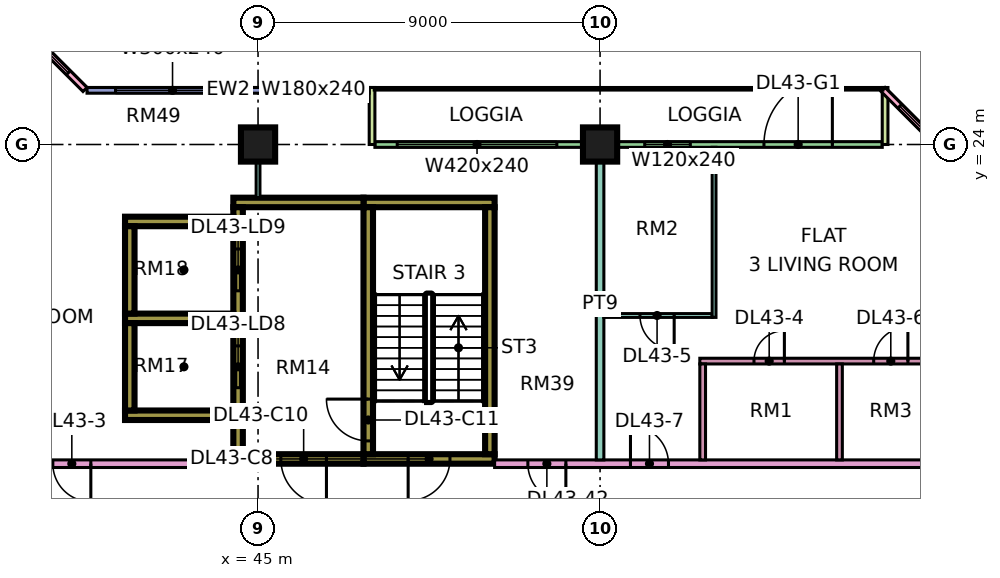
"""IFC4 building model, lengths in metres.
Left out: names, types, materials, properties, quantities, classifications, styles, units other than length and angle.
Written with IfcOpenShell. Run it as: python <this file> out.ifc"""

import sys

from ifc_helpers import new_model, si_unit, direction, frame, frame_2d, origin, origin_2d, place, context, subcontext, project, spatial, rectangle, extrude, element, fill, save


model = new_model("IFC4")
c1 = context("Model", 3, precision=1e-05, world=origin(), true_north=direction((0.0, 1.0)))
c2 = subcontext(c1, "Body", "Model", "MODEL_VIEW")
j1 = project(units=[si_unit("LENGTHUNIT", "METRE"), si_unit("PLANEANGLEUNIT", "RADIAN")], contexts=[c1])
p1 = place(None, origin())
s1 = spatial("IfcSite", under=j1, at=p1, CompositionType="ELEMENT")
p2 = place(p1, origin())
s2 = spatial("IfcBuilding", under=s1, at=p2, CompositionType="ELEMENT")
p3 = place(p2, frame((0.0, 0.0, 187.4)))
s3 = spatial("IfcBuildingStorey", under=s2, at=p3, CompositionType="ELEMENT", Elevation=187.4)
for number, where, z_axis, x_axis in (
    (1, (45.0, 24.0, 0.0), (0.0, 0.0, 1.0), (1.0, 0.0, 0.0)),
    (2, (54.0, 24.0, 0.0), (0.0, 0.0, 1.0), (1.0, 0.0, 0.0)),
):
    element("IfcColumn", number, at=place(p3, frame(where, z_axis=z_axis, x_axis=x_axis)), inside=s3, PredefinedType="COLUMN", context=c2, shape_type="SweptSolid", body=[
        extrude(rectangle(XDim=0.9, YDim=0.9, at=origin_2d()), origin(), (0.0, 0.0, 1.0), 3.75),
    ])
p4 = place(p3, frame((47.775, 15.725, 0.0), z_axis=(0.0, 0.0, 1.0), x_axis=(1.0, 0.0, 0.0)))
e3 = element("IfcWall", 3, at=p4, inside=s3, PredefinedType="SHEAR", context=c2, shape_type="SweptSolid", body=[
    extrude(rectangle(XDim=3.45, YDim=0.25, at=frame_2d((1.725, 0.0))), origin(), (0.0, 0.0, 1.0), 3.75),
])
p5 = place(p4, frame((1.175, 0.0, 0.0)))
e4 = element("IfcOpeningElement", 4, at=p5, cuts=e3, PredefinedType="OPENING", context=c2, shape_type="SweptSolid", body=[
    extrude(rectangle(XDim=1.1, YDim=2.2, at=frame_2d((0.55, 1.1))), frame((0.0, 0.135, 0.0), z_axis=(0.0, -1.0, 0.0), x_axis=(1.0, 0.0, 0.0)), (0.0, 0.0, 1.0), 0.27),
])
p6 = place(p3, frame((47.775, 22.475, 0.0), z_axis=(0.0, 0.0, 1.0), x_axis=(1.0, 0.0, 0.0)))
e5 = element("IfcWall", 5, at=p6, inside=s3, PredefinedType="SHEAR", context=c2, shape_type="SweptSolid", body=[
    extrude(rectangle(XDim=3.45, YDim=0.25, at=frame_2d((1.725, 0.0))), origin(), (0.0, 0.0, 1.0), 3.75),
])
p7 = place(p3, frame((47.9, 15.85, 0.0), z_axis=(0.0, 0.0, 1.0), x_axis=(0.0, 1.0, 0.0)))
e6 = element("IfcWall", 6, at=p7, inside=s3, PredefinedType="SHEAR", context=c2, shape_type="SweptSolid", body=[
    extrude(rectangle(XDim=6.5, YDim=0.25, at=frame_2d((3.25, 0.0))), origin(), (0.0, 0.0, 1.0), 3.75),
])
p8 = place(p7, frame((0.35, 0.0, 0.0)))
e7 = element("IfcOpeningElement", 7, at=p8, cuts=e6, PredefinedType="OPENING", context=c2, shape_type="SweptSolid", body=[
    extrude(rectangle(XDim=1.1, YDim=2.2, at=frame_2d((0.55, 1.1))), frame((0.0, 0.135, 0.0), z_axis=(0.0, -1.0, 0.0), x_axis=(1.0, 0.0, 0.0)), (0.0, 0.0, 1.0), 0.27),
])
p9 = place(p3, frame((51.1, 15.85, 0.0), z_axis=(0.0, 0.0, 1.0), x_axis=(0.0, 1.0, 0.0)))
e8 = element("IfcWall", 8, at=p9, inside=s3, PredefinedType="SHEAR", context=c2, shape_type="SweptSolid", body=[
    extrude(rectangle(XDim=6.5, YDim=0.25, at=frame_2d((3.25, 0.0))), origin(), (0.0, 0.0, 1.0), 3.75),
])
p10 = place(p3, frame((44.35, 15.725, 0.0), z_axis=(0.0, 0.0, 1.0), x_axis=(1.0, 0.0, 0.0)))
e9 = element("IfcWall", 9, at=p10, inside=s3, PredefinedType="SHEAR", context=c2, shape_type="SweptSolid", body=[
    extrude(rectangle(XDim=3.425, YDim=0.25, at=frame_2d((1.712, 0.0))), origin(), (0.0, 0.0, 1.0), 3.75),
])
p11 = place(p10, frame((1.25, 0.0, 0.0)))
e10 = element("IfcOpeningElement", 10, at=p11, cuts=e9, PredefinedType="OPENING", context=c2, shape_type="SweptSolid", body=[
    extrude(rectangle(XDim=1.2, YDim=2.2, at=frame_2d((0.6, 1.1))), frame((0.0, 0.135, 0.0), z_axis=(0.0, -1.0, 0.0), x_axis=(1.0, 0.0, 0.0)), (0.0, 0.0, 1.0), 0.27),
])
p12 = place(p3, frame((44.35, 22.475, 0.0), z_axis=(0.0, 0.0, 1.0), x_axis=(1.0, 0.0, 0.0)))
e11 = element("IfcWall", 11, at=p12, inside=s3, PredefinedType="SHEAR", context=c2, shape_type="SweptSolid", body=[
    extrude(rectangle(XDim=3.425, YDim=0.25, at=frame_2d((1.712, 0.0))), origin(), (0.0, 0.0, 1.0), 3.75),
])
p13 = place(p3, frame((44.475, 15.85, 0.0), z_axis=(0.0, 0.0, 1.0), x_axis=(0.0, 1.0, 0.0)))
e12 = element("IfcWall", 12, at=p13, inside=s3, PredefinedType="SHEAR", context=c2, shape_type="SweptSolid", body=[
    extrude(rectangle(XDim=6.5, YDim=0.25, at=frame_2d((3.25, 0.0))), origin(), (0.0, 0.0, 1.0), 3.75),
])
p14 = place(p13, frame((1.75, 0.0, 0.0)))
e13 = element("IfcOpeningElement", 13, at=p14, cuts=e12, PredefinedType="OPENING", context=c2, shape_type="SweptSolid", body=[
    extrude(rectangle(XDim=1.1, YDim=2.2, at=frame_2d((0.55, 1.1))), frame((0.0, 0.135, 0.0), z_axis=(0.0, -1.0, 0.0), x_axis=(1.0, 0.0, 0.0)), (0.0, 0.0, 1.0), 0.27),
])
p15 = place(p13, frame((4.3, 0.0, 0.0)))
e14 = element("IfcOpeningElement", 14, at=p15, cuts=e12, PredefinedType="OPENING", context=c2, shape_type="SweptSolid", body=[
    extrude(rectangle(XDim=1.1, YDim=2.2, at=frame_2d((0.55, 1.1))), frame((0.0, 0.135, 0.0), z_axis=(0.0, -1.0, 0.0), x_axis=(1.0, 0.0, 0.0)), (0.0, 0.0, 1.0), 0.27),
])
for number, where, z_axis, x_axis in (
    (15, (41.5, 16.875, 0.0), (0.0, 0.0, 1.0), (1.0, 0.0, 0.0)),
    (16, (41.5, 19.425, 0.0), (0.0, 0.0, 1.0), (1.0, 0.0, 0.0)),
    (17, (41.5, 21.975, 0.0), (0.0, 0.0, 1.0), (1.0, 0.0, 0.0)),
):
    element("IfcWall", number, at=place(p3, frame(where, z_axis=z_axis, x_axis=x_axis)), inside=s3, PredefinedType="SHEAR", context=c2, shape_type="SweptSolid", body=[
        extrude(rectangle(XDim=2.85, YDim=0.25, at=frame_2d((1.425, 0.0))), origin(), (0.0, 0.0, 1.0), 3.75),
    ])
for number, where, z_axis, x_axis in (
    (18, (41.625, 17.0, 0.0), (0.0, 0.0, 1.0), (0.0, 1.0, 0.0)),
    (19, (41.625, 19.55, 0.0), (0.0, 0.0, 1.0), (0.0, 1.0, 0.0)),
):
    element("IfcWall", number, at=place(p3, frame(where, z_axis=z_axis, x_axis=x_axis)), inside=s3, PredefinedType="SHEAR", context=c2, shape_type="SweptSolid", body=[
        extrude(rectangle(XDim=2.3, YDim=0.25, at=frame_2d((1.15, 0.0))), origin(), (0.0, 0.0, 1.0), 3.75),
    ])
p16 = place(p3, frame((61.425, 24.0, 0.0), z_axis=(0.0, 0.0, 1.0), x_axis=(-1.0, 0.0, 0.0)))
e20 = element("IfcWall", 20, at=p16, inside=s3, PredefinedType="SOLIDWALL", context=c2, shape_type="SweptSolid", body=[
    extrude(rectangle(XDim=13.35, YDim=0.15, at=frame_2d((6.675, 0.0))), origin(), (0.0, 0.0, 1.0), 3.35),
])
p17 = place(p16, frame((1.312, 0.0, 0.0)))
e21 = element("IfcOpeningElement", 21, at=p17, cuts=e20, PredefinedType="OPENING", context=c2, shape_type="SweptSolid", body=[
    extrude(rectangle(XDim=1.8, YDim=2.4, at=frame_2d((0.9, 1.2))), frame((0.0, 0.085, 0.0), z_axis=(0.0, -1.0, 0.0), x_axis=(1.0, 0.0, 0.0)), (0.0, 0.0, 1.0), 0.17),
])
p18 = place(p16, frame((5.05, 0.0, 0.45)))
e22 = element("IfcOpeningElement", 22, at=p18, cuts=e20, PredefinedType="OPENING", context=c2, shape_type="SweptSolid", body=[
    extrude(rectangle(XDim=1.2, YDim=2.4, at=frame_2d((0.6, 1.2))), frame((0.0, 0.085, 0.0), z_axis=(0.0, -1.0, 0.0), x_axis=(1.0, 0.0, 0.0)), (0.0, 0.0, 1.0), 0.17),
])
p19 = place(p16, frame((8.562, 0.0, 0.45)))
e23 = element("IfcOpeningElement", 23, at=p19, cuts=e20, PredefinedType="OPENING", context=c2, shape_type="SweptSolid", body=[
    extrude(rectangle(XDim=4.2, YDim=2.4, at=frame_2d((2.1, 1.2))), frame((0.0, 0.085, 0.0), z_axis=(0.0, -1.0, 0.0), x_axis=(1.0, 0.0, 0.0)), (0.0, 0.0, 1.0), 0.17),
])
for number, where, z_axis, x_axis in (
    (24, (61.5, 25.5, 0.0), (0.0, 0.0, 1.0), (0.0, -1.0, 0.0)),
    (25, (48.0, 25.5, 0.0), (0.0, 0.0, 1.0), (0.0, -1.0, 0.0)),
):
    element("IfcWall", number, at=place(p3, frame(where, z_axis=z_axis, x_axis=x_axis)), inside=s3, PredefinedType="SOLIDWALL", context=c2, shape_type="SweptSolid", body=[
        extrude(rectangle(XDim=1.5, YDim=0.15, at=frame_2d((0.75, 0.0))), origin(), (0.0, 0.0, 1.0), 3.35),
    ])
p20 = place(p3, frame((47.925, 25.425, 0.0), z_axis=(0.0, 0.0, 1.0), x_axis=(-1.0, 0.0, 0.0)))
e26 = element("IfcWall", 26, at=p20, inside=s3, PredefinedType="SOLIDWALL", context=c2, shape_type="SweptSolid", body=[
    extrude(rectangle(XDim=7.425, YDim=0.15, at=frame_2d((3.712, 0.0))), origin(), (0.0, 0.0, 1.0), 3.35),
])
p21 = place(p20, frame((0.562, 0.0, 0.45)))
e27 = element("IfcOpeningElement", 27, at=p21, cuts=e26, PredefinedType="OPENING", context=c2, shape_type="SweptSolid", body=[
    extrude(rectangle(XDim=1.8, YDim=2.4, at=frame_2d((0.9, 1.2))), frame((0.0, 0.085, 0.0), z_axis=(0.0, -1.0, 0.0), x_axis=(1.0, 0.0, 0.0)), (0.0, 0.0, 1.0), 0.17),
])
p22 = place(p20, frame((3.675, 0.0, 0.45)))
e28 = element("IfcOpeningElement", 28, at=p22, cuts=e26, PredefinedType="OPENING", context=c2, shape_type="SweptSolid", body=[
    extrude(rectangle(XDim=3.0, YDim=2.4, at=frame_2d((1.5, 1.2))), frame((0.0, 0.085, 0.0), z_axis=(0.0, -1.0, 0.0), x_axis=(1.0, 0.0, 0.0)), (0.0, 0.0, 1.0), 0.17),
])
p23 = place(p3, frame((40.447, 25.447, 0.0), z_axis=(0.0, 0.0, 1.0), x_axis=(-0.707106781187, 0.707106781187, 0.0)))
e29 = element("IfcWall", 29, at=p23, inside=s3, PredefinedType="SOLIDWALL", context=c2, shape_type="SweptSolid", body=[
    extrude(rectangle(XDim=4.243, YDim=0.15, at=frame_2d((2.121, 0.0))), origin(), (0.0, 0.0, 1.0), 3.35),
])
p24 = place(p23, frame((0.621, 0.0, 0.45)))
e30 = element("IfcOpeningElement", 30, at=p24, cuts=e29, PredefinedType="OPENING", context=c2, shape_type="SweptSolid", body=[
    extrude(rectangle(XDim=3.0, YDim=2.4, at=frame_2d((1.5, 1.2))), frame((0.0, 0.085, 0.0), z_axis=(0.0, -1.0, 0.0), x_axis=(1.0, 0.0, 0.0)), (0.0, 0.0, 1.0), 0.17),
])
p25 = place(p3, frame((64.447, 22.447, 0.0), z_axis=(0.0, 0.0, 1.0), x_axis=(-0.707106781187, 0.707106781187, 0.0)))
e31 = element("IfcWall", 31, at=p25, inside=s3, PredefinedType="SOLIDWALL", context=c2, shape_type="SweptSolid", body=[
    extrude(rectangle(XDim=4.243, YDim=0.15, at=frame_2d((2.121, 0.0))), origin(), (0.0, 0.0, 1.0), 3.35),
])
p26 = place(p25, frame((0.621, 0.0, 0.45)))
e32 = element("IfcOpeningElement", 32, at=p26, cuts=e31, PredefinedType="OPENING", context=c2, shape_type="SweptSolid", body=[
    extrude(rectangle(XDim=3.0, YDim=2.4, at=frame_2d((1.5, 1.2))), frame((0.0, 0.085, 0.0), z_axis=(0.0, -1.0, 0.0), x_axis=(1.0, 0.0, 0.0)), (0.0, 0.0, 1.0), 0.17),
])
p27 = place(p3, frame((34.0, 15.6, 0.0), z_axis=(0.0, 0.0, 1.0), x_axis=(1.0, 0.0, 0.0)))
e33 = element("IfcWall", 33, at=p27, inside=s3, PredefinedType="PARTITIONING", context=c2, shape_type="SweptSolid", body=[
    extrude(rectangle(XDim=10.35, YDim=0.2, at=frame_2d((5.175, 0.0))), origin(), (0.0, 0.0, 1.0), 3.35),
])
p28 = place(p27, frame((5.6, 0.0, 0.0)))
e34 = element("IfcOpeningElement", 34, at=p28, cuts=e33, PredefinedType="OPENING", context=c2, shape_type="SweptSolid", body=[
    extrude(rectangle(XDim=1.0, YDim=2.1, at=frame_2d((0.5, 1.05))), frame((0.0, 0.11, 0.0), z_axis=(0.0, -1.0, 0.0), x_axis=(1.0, 0.0, 0.0)), (0.0, 0.0, 1.0), 0.22),
])
p29 = place(p27, frame((0.45, 0.0, 0.0)))
e35 = element("IfcOpeningElement", 35, at=p29, cuts=e33, PredefinedType="OPENING", context=c2, shape_type="SweptSolid", body=[
    extrude(rectangle(XDim=1.2, YDim=2.1, at=frame_2d((0.6, 1.05))), frame((0.0, 0.11, 0.0), z_axis=(0.0, -1.0, 0.0), x_axis=(1.0, 0.0, 0.0)), (0.0, 0.0, 1.0), 0.22),
])
p30 = place(p3, frame((45.0, 22.6, 0.0), z_axis=(0.0, 0.0, 1.0), x_axis=(0.0, 1.0, 0.0)))
e36 = element("IfcWall", 36, at=p30, inside=s3, PredefinedType="PARTITIONING", context=c2, shape_type="SweptSolid", body=[
    extrude(rectangle(XDim=1.4, YDim=0.1, at=frame_2d((0.7, 0.0))), origin(), (0.0, 0.0, 1.0), 3.35),
])
p31 = place(p3, frame((51.225, 15.6, 0.0), z_axis=(0.0, 0.0, 1.0), x_axis=(1.0, 0.0, 0.0)))
e37 = element("IfcWall", 37, at=p31, inside=s3, PredefinedType="PARTITIONING", context=c2, shape_type="SweptSolid", body=[
    extrude(rectangle(XDim=13.125, YDim=0.2, at=frame_2d((6.562, 0.0))), origin(), (0.0, 0.0, 1.0), 3.35),
])
p32 = place(p31, frame((3.575, 0.0, 0.0)))
e38 = element("IfcOpeningElement", 38, at=p32, cuts=e37, PredefinedType="OPENING", context=c2, shape_type="SweptSolid", body=[
    extrude(rectangle(XDim=1.0, YDim=2.1, at=frame_2d((0.5, 1.05))), frame((0.0, 0.11, 0.0), z_axis=(0.0, -1.0, 0.0), x_axis=(1.0, 0.0, 0.0)), (0.0, 0.0, 1.0), 0.22),
])
p33 = place(p31, frame((0.875, 0.0, 0.0)))
e39 = element("IfcOpeningElement", 39, at=p33, cuts=e37, PredefinedType="OPENING", context=c2, shape_type="SweptSolid", body=[
    extrude(rectangle(XDim=1.0, YDim=2.1, at=frame_2d((0.5, 1.05))), frame((0.0, 0.11, 0.0), z_axis=(0.0, -1.0, 0.0), x_axis=(1.0, 0.0, 0.0)), (0.0, 0.0, 1.0), 0.22),
])
p34 = place(p3, frame((54.0, 15.7, 0.0), z_axis=(0.0, 0.0, 1.0), x_axis=(0.0, 1.0, 0.0)))
e40 = element("IfcWall", 40, at=p34, inside=s3, PredefinedType="PARTITIONING", context=c2, shape_type="SweptSolid", body=[
    extrude(rectangle(XDim=8.226, YDim=0.2, at=frame_2d((4.113, 0.0))), origin(), (0.0, 0.0, 1.0), 3.35),
])
p35 = place(p3, frame((54.1, 19.5, 0.0), z_axis=(0.0, 0.0, 1.0), x_axis=(1.0, 0.0, 0.0)))
e41 = element("IfcWall", 41, at=p35, inside=s3, PredefinedType="PARTITIONING", context=c2, shape_type="SweptSolid", body=[
    extrude(rectangle(XDim=2.85, YDim=0.1, at=frame_2d((1.425, 0.0))), origin(), (0.0, 0.0, 1.0), 3.35),
])
p36 = place(p35, frame((0.95, 0.0, 0.0)))
e42 = element("IfcOpeningElement", 42, at=p36, cuts=e41, PredefinedType="OPENING", context=c2, shape_type="SweptSolid", body=[
    extrude(rectangle(XDim=0.9, YDim=2.1, at=frame_2d((0.45, 1.05))), frame((0.0, 0.06, 0.0), z_axis=(0.0, -1.0, 0.0), x_axis=(1.0, 0.0, 0.0)), (0.0, 0.0, 1.0), 0.12),
])
p37 = place(p3, frame((56.625, 18.3, 0.0), z_axis=(0.0, 0.0, 1.0), x_axis=(1.0, 0.0, 0.0)))
e43 = element("IfcWall", 43, at=p37, inside=s3, PredefinedType="PARTITIONING", context=c2, shape_type="SweptSolid", body=[
    extrude(rectangle(XDim=7.725, YDim=0.15, at=frame_2d((3.863, 0.0))), origin(), (0.0, 0.0, 1.0), 3.35),
])
p38 = place(p37, frame((1.425, 0.0, 0.0)))
e44 = element("IfcOpeningElement", 44, at=p38, cuts=e43, PredefinedType="OPENING", context=c2, shape_type="SweptSolid", body=[
    extrude(rectangle(XDim=0.8, YDim=2.1, at=frame_2d((0.4, 1.05))), frame((0.0, 0.085, 0.0), z_axis=(0.0, -1.0, 0.0), x_axis=(1.0, 0.0, 0.0)), (0.0, 0.0, 1.0), 0.17),
])
p39 = place(p37, frame((4.575, 0.0, 0.0)))
e45 = element("IfcOpeningElement", 45, at=p39, cuts=e43, PredefinedType="OPENING", context=c2, shape_type="SweptSolid", body=[
    extrude(rectangle(XDim=0.9, YDim=2.1, at=frame_2d((0.45, 1.05))), frame((0.0, 0.085, 0.0), z_axis=(0.0, -1.0, 0.0), x_axis=(1.0, 0.0, 0.0)), (0.0, 0.0, 1.0), 0.17),
])
p40 = place(p3, frame((56.7, 15.7, 0.0), z_axis=(0.0, 0.0, 1.0), x_axis=(0.0, 1.0, 0.0)))
e46 = element("IfcWall", 46, at=p40, inside=s3, PredefinedType="PARTITIONING", context=c2, shape_type="SweptSolid", body=[
    extrude(rectangle(XDim=2.525, YDim=0.15, at=frame_2d((1.263, 0.0))), origin(), (0.0, 0.0, 1.0), 3.35),
])
p41 = place(p3, frame((57.0, 19.45, 0.0), z_axis=(0.0, 0.0, 1.0), x_axis=(0.0, 1.0, 0.0)))
e47 = element("IfcWall", 47, at=p41, inside=s3, PredefinedType="PARTITIONING", context=c2, shape_type="SweptSolid", body=[
    extrude(rectangle(XDim=4.476, YDim=0.1, at=frame_2d((2.238, 0.0))), origin(), (0.0, 0.0, 1.0), 3.35),
])
p42 = place(p3, frame((60.3, 15.7, 0.0), z_axis=(0.0, 0.0, 1.0), x_axis=(0.0, 1.0, 0.0)))
e48 = element("IfcWall", 48, at=p42, inside=s3, PredefinedType="PARTITIONING", context=c2, shape_type="SweptSolid", body=[
    extrude(rectangle(XDim=2.525, YDim=0.15, at=frame_2d((1.263, 0.0))), origin(), (0.0, 0.0, 1.0), 3.35),
])
p43 = place(p17, frame((1.8, 0.0, 0.0), z_axis=(0.0, 0.0, 1.0), x_axis=(-1.0, 0.0, 0.0)))
e49 = element("IfcDoor", 49, at=p43, inside=s3, OperationType="DOUBLE_DOOR_SINGLE_SWING", PredefinedType="DOOR", context=c2, shape_type="SweptSolid", body=[
    extrude(rectangle(XDim=1.8, YDim=2.4, at=frame_2d((0.9, 1.2))), frame((0.0, 0.025, 0.0), z_axis=(0.0, -1.0, 0.0), x_axis=(1.0, 0.0, 0.0)), (0.0, 0.0, 1.0), 0.05),
])
fill(e21, e49)
p44 = place(p18, origin())
e50 = element("IfcWindow", 50, at=p44, inside=s3, PartitioningType="SINGLE_PANEL", PredefinedType="WINDOW", context=c2, shape_type="SweptSolid", body=[
    extrude(rectangle(XDim=1.2, YDim=2.4, at=frame_2d((0.6, 1.2))), frame((0.0, 0.03, 0.0), z_axis=(0.0, -1.0, 0.0), x_axis=(1.0, 0.0, 0.0)), (0.0, 0.0, 1.0), 0.06),
])
fill(e22, e50)
p45 = place(p19, origin())
e51 = element("IfcWindow", 51, at=p45, inside=s3, PartitioningType="SINGLE_PANEL", PredefinedType="WINDOW", context=c2, shape_type="SweptSolid", body=[
    extrude(rectangle(XDim=4.2, YDim=2.4, at=frame_2d((2.1, 1.2))), frame((0.0, 0.03, 0.0), z_axis=(0.0, -1.0, 0.0), x_axis=(1.0, 0.0, 0.0)), (0.0, 0.0, 1.0), 0.06),
])
fill(e23, e51)
p46 = place(p21, origin())
e52 = element("IfcWindow", 52, at=p46, inside=s3, PartitioningType="SINGLE_PANEL", PredefinedType="WINDOW", context=c2, shape_type="SweptSolid", body=[
    extrude(rectangle(XDim=1.8, YDim=2.4, at=frame_2d((0.9, 1.2))), frame((0.0, 0.03, 0.0), z_axis=(0.0, -1.0, 0.0), x_axis=(1.0, 0.0, 0.0)), (0.0, 0.0, 1.0), 0.06),
])
fill(e27, e52)
p47 = place(p22, origin())
e53 = element("IfcWindow", 53, at=p47, inside=s3, PartitioningType="SINGLE_PANEL", PredefinedType="WINDOW", context=c2, shape_type="SweptSolid", body=[
    extrude(rectangle(XDim=3.0, YDim=2.4, at=frame_2d((1.5, 1.2))), frame((0.0, 0.03, 0.0), z_axis=(0.0, -1.0, 0.0), x_axis=(1.0, 0.0, 0.0)), (0.0, 0.0, 1.0), 0.06),
])
fill(e28, e53)
p48 = place(p24, origin())
e54 = element("IfcWindow", 54, at=p48, inside=s3, PartitioningType="SINGLE_PANEL", PredefinedType="WINDOW", context=c2, shape_type="SweptSolid", body=[
    extrude(rectangle(XDim=3.0, YDim=2.4, at=frame_2d((1.5, 1.2))), frame((0.0, 0.03, 0.0), z_axis=(0.0, -1.0, 0.0), x_axis=(1.0, 0.0, 0.0)), (0.0, 0.0, 1.0), 0.06),
])
fill(e30, e54)
p49 = place(p26, origin())
e55 = element("IfcWindow", 55, at=p49, inside=s3, PartitioningType="SINGLE_PANEL", PredefinedType="WINDOW", context=c2, shape_type="SweptSolid", body=[
    extrude(rectangle(XDim=3.0, YDim=2.4, at=frame_2d((1.5, 1.2))), frame((0.0, 0.03, 0.0), z_axis=(0.0, -1.0, 0.0), x_axis=(1.0, 0.0, 0.0)), (0.0, 0.0, 1.0), 0.06),
])
fill(e32, e55)
p50 = place(p5, frame((1.1, 0.0, 0.0), z_axis=(0.0, 0.0, 1.0), x_axis=(-1.0, 0.0, 0.0)))
e56 = element("IfcDoor", 56, at=p50, inside=s3, OperationType="SINGLE_SWING_LEFT", PredefinedType="DOOR", context=c2, shape_type="SweptSolid", body=[
    extrude(rectangle(XDim=1.1, YDim=2.2, at=frame_2d((0.55, 1.1))), frame((0.0, 0.025, 0.0), z_axis=(0.0, -1.0, 0.0), x_axis=(1.0, 0.0, 0.0)), (0.0, 0.0, 1.0), 0.05),
])
fill(e4, e56)
p51 = place(p11, origin())
e57 = element("IfcDoor", 57, at=p51, inside=s3, OperationType="SINGLE_SWING_RIGHT", PredefinedType="DOOR", context=c2, shape_type="SweptSolid", body=[
    extrude(rectangle(XDim=1.2, YDim=2.2, at=frame_2d((0.6, 1.1))), frame((0.0, 0.025, 0.0), z_axis=(0.0, -1.0, 0.0), x_axis=(1.0, 0.0, 0.0)), (0.0, 0.0, 1.0), 0.05),
])
fill(e10, e57)
p52 = place(p8, frame((1.1, 0.0, 0.0), z_axis=(0.0, 0.0, 1.0), x_axis=(-1.0, 0.0, 0.0)))
e58 = element("IfcDoor", 58, at=p52, inside=s3, OperationType="SINGLE_SWING_RIGHT", PredefinedType="DOOR", context=c2, shape_type="SweptSolid", body=[
    extrude(rectangle(XDim=1.1, YDim=2.2, at=frame_2d((0.55, 1.1))), frame((0.0, 0.025, 0.0), z_axis=(0.0, -1.0, 0.0), x_axis=(1.0, 0.0, 0.0)), (0.0, 0.0, 1.0), 0.05),
])
fill(e7, e58)
p53 = place(p14, origin())
e59 = element("IfcDoor", 59, at=p53, inside=s3, OperationType="DOUBLE_DOOR_SLIDING", PredefinedType="DOOR", context=c2, shape_type="SweptSolid", body=[
    extrude(rectangle(XDim=1.1, YDim=2.2, at=frame_2d((0.55, 1.1))), frame((0.0, 0.025, 0.0), z_axis=(0.0, -1.0, 0.0), x_axis=(1.0, 0.0, 0.0)), (0.0, 0.0, 1.0), 0.05),
])
fill(e13, e59)
p54 = place(p15, origin())
e60 = element("IfcDoor", 60, at=p54, inside=s3, OperationType="DOUBLE_DOOR_SLIDING", PredefinedType="DOOR", context=c2, shape_type="SweptSolid", body=[
    extrude(rectangle(XDim=1.1, YDim=2.2, at=frame_2d((0.55, 1.1))), frame((0.0, 0.025, 0.0), z_axis=(0.0, -1.0, 0.0), x_axis=(1.0, 0.0, 0.0)), (0.0, 0.0, 1.0), 0.05),
])
fill(e14, e60)
p55 = place(p28, origin())
e61 = element("IfcDoor", 61, at=p55, inside=s3, OperationType="SINGLE_SWING_RIGHT", PredefinedType="DOOR", context=c2, shape_type="SweptSolid", body=[
    extrude(rectangle(XDim=1.0, YDim=2.1, at=frame_2d((0.5, 1.05))), frame((0.0, 0.025, 0.0), z_axis=(0.0, -1.0, 0.0), x_axis=(1.0, 0.0, 0.0)), (0.0, 0.0, 1.0), 0.05),
])
fill(e34, e61)
p56 = place(p38, frame((0.8, 0.0, 0.0), z_axis=(0.0, 0.0, 1.0), x_axis=(-1.0, 0.0, 0.0)))
e62 = element("IfcDoor", 62, at=p56, inside=s3, OperationType="SINGLE_SWING_RIGHT", PredefinedType="DOOR", context=c2, shape_type="SweptSolid", body=[
    extrude(rectangle(XDim=0.8, YDim=2.1, at=frame_2d((0.4, 1.05))), frame((0.0, 0.025, 0.0), z_axis=(0.0, -1.0, 0.0), x_axis=(1.0, 0.0, 0.0)), (0.0, 0.0, 1.0), 0.05),
])
fill(e44, e62)
p57 = place(p36, origin())
e63 = element("IfcDoor", 63, at=p57, inside=s3, OperationType="SINGLE_SWING_RIGHT", PredefinedType="DOOR", context=c2, shape_type="SweptSolid", body=[
    extrude(rectangle(XDim=0.9, YDim=2.1, at=frame_2d((0.45, 1.05))), frame((0.0, 0.025, 0.0), z_axis=(0.0, -1.0, 0.0), x_axis=(1.0, 0.0, 0.0)), (0.0, 0.0, 1.0), 0.05),
])
fill(e42, e63)
p58 = place(p39, frame((0.9, 0.0, 0.0), z_axis=(0.0, 0.0, 1.0), x_axis=(-1.0, 0.0, 0.0)))
e64 = element("IfcDoor", 64, at=p58, inside=s3, OperationType="SINGLE_SWING_RIGHT", PredefinedType="DOOR", context=c2, shape_type="SweptSolid", body=[
    extrude(rectangle(XDim=0.9, YDim=2.1, at=frame_2d((0.45, 1.05))), frame((0.0, 0.025, 0.0), z_axis=(0.0, -1.0, 0.0), x_axis=(1.0, 0.0, 0.0)), (0.0, 0.0, 1.0), 0.05),
])
fill(e45, e64)
p59 = place(p32, origin())
e65 = element("IfcDoor", 65, at=p59, inside=s3, OperationType="SINGLE_SWING_LEFT", PredefinedType="DOOR", context=c2, shape_type="SweptSolid", body=[
    extrude(rectangle(XDim=1.0, YDim=2.1, at=frame_2d((0.5, 1.05))), frame((0.0, 0.025, 0.0), z_axis=(0.0, -1.0, 0.0), x_axis=(1.0, 0.0, 0.0)), (0.0, 0.0, 1.0), 0.05),
])
fill(e38, e65)
p60 = place(p33, origin())
e66 = element("IfcDoor", 66, at=p60, inside=s3, OperationType="SINGLE_SWING_RIGHT", PredefinedType="DOOR", context=c2, shape_type="SweptSolid", body=[
    extrude(rectangle(XDim=1.0, YDim=2.1, at=frame_2d((0.5, 1.05))), frame((0.0, 0.025, 0.0), z_axis=(0.0, -1.0, 0.0), x_axis=(1.0, 0.0, 0.0)), (0.0, 0.0, 1.0), 0.05),
])
fill(e39, e66)
save(model, sys.argv[1])
